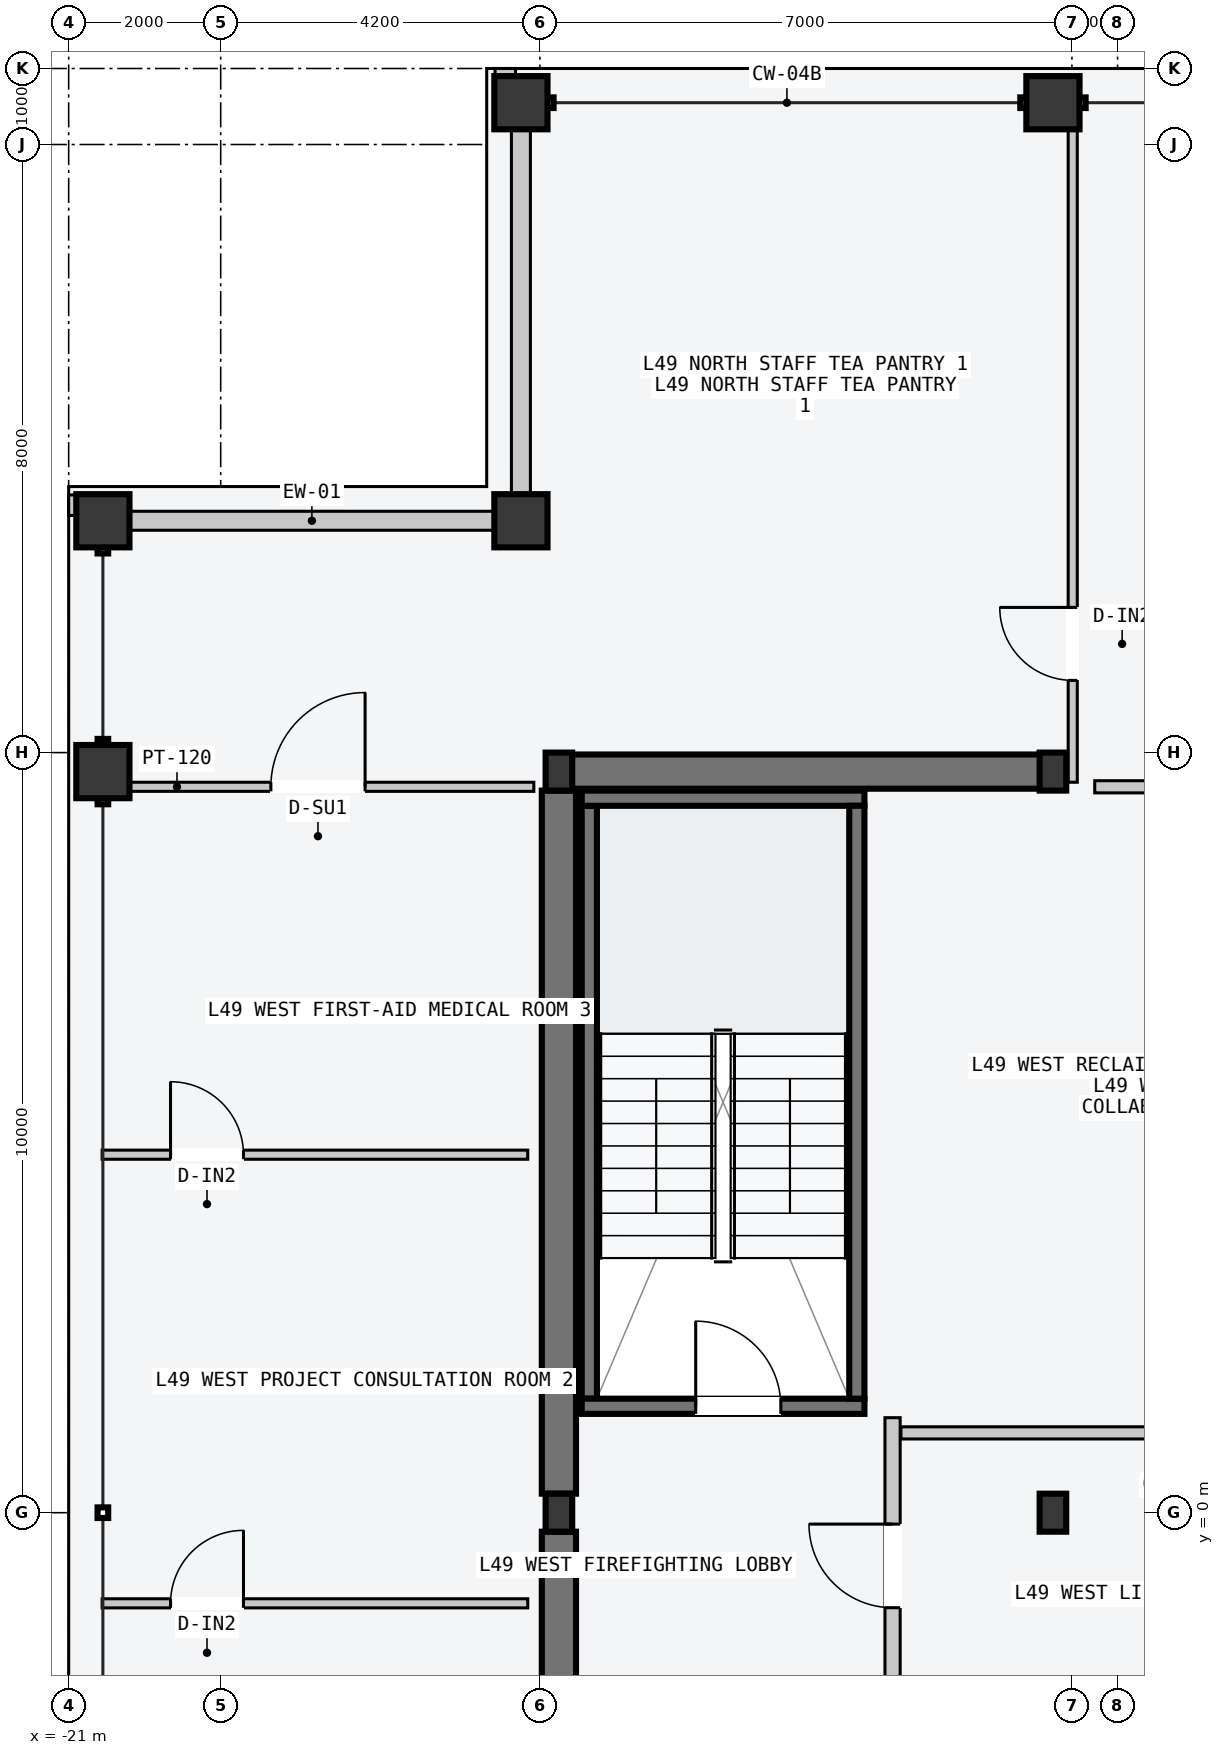
"""IFC4 building model, lengths in metres.
Left out: names, types, materials, properties, quantities, classifications, styles, units other than length and angle.
Written with IfcOpenShell. Run it as: python <this file> out.ifc"""

import sys

from ifc_helpers import new_model, si_unit, direction, frame, frame_2d, origin, origin_2d, place, context, subcontext, project, spatial, rectangle, hollow_rectangle, i_section, extrude, element, fill, save


model = new_model("IFC4")
c1 = context("Model", 3, precision=1e-05, world=origin(), true_north=direction((0.0, 1.0)))
c2 = subcontext(c1, "Body", "Model", "MODEL_VIEW")
j1 = project(units=[si_unit("LENGTHUNIT", "METRE"), si_unit("PLANEANGLEUNIT", "RADIAN")], contexts=[c1])
p1 = place(None, origin())
s1 = spatial("IfcSite", under=j1, at=p1, CompositionType="ELEMENT")
p2 = place(p1, origin())
s2 = spatial("IfcBuilding", under=s1, at=p2, CompositionType="ELEMENT")
p3 = place(p2, frame((0.0, 0.0, 187.5)))
s3 = spatial("IfcBuildingStorey", under=s2, at=p3, CompositionType="ELEMENT", Elevation=187.5)
p4 = place(p3, frame((-14.53, 9.75, -0.2), z_axis=(0.0, 0.0, 1.0), x_axis=(1.0, 0.0, 0.0)))
e1 = element("IfcWall", 1, at=p4, inside=s3, PredefinedType="SHEAR", context=c2, shape_type="SweptSolid", body=[
    extrude(rectangle(XDim=6.46, YDim=0.45, at=frame_2d((3.23, 0.0))), origin(), (0.0, 0.0, 1.0), 3.6),
])
for number, where, z_axis, x_axis in (
    (2, (-14.55, -9.5, -0.2), (0.0, 0.0, 1.0), (0.0, 1.0, 0.0)),
    (3, (-14.55, 0.25, -0.2), (0.0, 0.0, 1.0), (0.0, 1.0, 0.0)),
):
    element("IfcWall", number, at=place(p3, frame(where, z_axis=z_axis, x_axis=x_axis)), inside=s3, PredefinedType="SHEAR", context=c2, shape_type="SweptSolid", body=[
        extrude(rectangle(XDim=9.25, YDim=0.45, at=frame_2d((4.625, 0.0))), origin(), (0.0, 0.0, 1.0), 3.6),
    ])
p5 = place(p3, frame((-14.15, 1.5, -0.2), z_axis=(0.0, 0.0, 1.0), x_axis=(0.0, 1.0, 0.0)))
e4 = element("IfcWall", 4, at=p5, inside=s3, PredefinedType="SOLIDWALL", context=c2, shape_type="SweptSolid", body=[
    extrude(rectangle(XDim=7.8, YDim=0.2, at=frame_2d((3.9, 0.0))), origin(), (0.0, 0.0, 1.0), 3.6),
])
p6 = place(p3, frame((-14.25, 1.4, -0.2), z_axis=(0.0, 0.0, 1.0), x_axis=(1.0, 0.0, 0.0)))
e5 = element("IfcWall", 5, at=p6, inside=s3, PredefinedType="SOLIDWALL", context=c2, shape_type="SweptSolid", body=[
    extrude(rectangle(XDim=3.72, YDim=0.2, at=frame_2d((1.86, 0.0))), origin(), (0.0, 0.0, 1.0), 3.6),
])
p7 = place(p6, frame((1.5, 0.0, 0.2)))
e6 = element("IfcOpeningElement", 6, at=p7, cuts=e5, PredefinedType="OPENING", context=c2, shape_type="SweptSolid", body=[
    extrude(rectangle(XDim=1.12, YDim=2.18, at=frame_2d((0.56, 1.09))), frame((0.0, 0.11, 0.0), z_axis=(0.0, -1.0, 0.0), x_axis=(1.0, 0.0, 0.0)), (0.0, 0.0, 1.0), 0.22),
])
p8 = place(p3, frame((-14.25, 9.4, -0.2), z_axis=(0.0, 0.0, 1.0), x_axis=(1.0, 0.0, 0.0)))
e7 = element("IfcWall", 7, at=p8, inside=s3, PredefinedType="SOLIDWALL", context=c2, shape_type="SweptSolid", body=[
    extrude(rectangle(XDim=3.72, YDim=0.2, at=frame_2d((1.86, 0.0))), origin(), (0.0, 0.0, 1.0), 3.6),
])
p9 = place(p3, frame((-10.63, 1.5, -0.2), z_axis=(0.0, 0.0, 1.0), x_axis=(0.0, 1.0, 0.0)))
e8 = element("IfcWall", 8, at=p9, inside=s3, PredefinedType="SOLIDWALL", context=c2, shape_type="SweptSolid", body=[
    extrude(rectangle(XDim=7.8, YDim=0.2, at=frame_2d((3.9, 0.0))), origin(), (0.0, 0.0, 1.0), 3.6),
])
for number, where, z_axis, x_axis in (
    (9, (-14.55, 0.0, 0.0), (0.0, 0.0, 1.0), (1.0, 0.0, 0.0)),
    (10, (-14.55, 9.75, 0.0), (0.0, 0.0, 1.0), (1.0, 0.0, 0.0)),
    (11, (-8.05, 0.0, 0.0), (0.0, 0.0, 1.0), (1.0, 0.0, 0.0)),
    (12, (-8.05, 9.75, 0.0), (0.0, 0.0, 1.0), (1.0, 0.0, 0.0)),
):
    element("IfcColumn", number, at=place(p3, frame(where, z_axis=z_axis, x_axis=x_axis)), inside=s3, PredefinedType="COLUMN", context=c2, shape_type="SweptSolid", body=[
        extrude(i_section(OverallWidth=0.35, OverallDepth=0.5, WebThickness=0.02, FlangeThickness=0.032, at=origin_2d()), origin(), (0.0, 0.0, 1.0), 3.6),
    ])
for number, where, z_axis, x_axis in (
    (13, (-15.05, 18.55, 0.0), (0.0, 0.0, 1.0), (1.0, 0.0, 0.0)),
    (14, (-8.05, 18.55, 0.0), (0.0, 0.0, 1.0), (1.0, 0.0, 0.0)),
    (15, (-20.55, 9.75, 0.0), (0.0, 0.0, 1.0), (0.0, 1.0, 0.0)),
    (16, (-20.55, 13.05, 0.0), (0.0, 0.0, 1.0), (0.0, 1.0, 0.0)),
    (17, (-15.05, 13.05, 0.0), (0.0, 0.0, 1.0), (1.0, 0.0, 0.0)),
):
    element("IfcColumn", number, at=place(p3, frame(where, z_axis=z_axis, x_axis=x_axis)), inside=s3, PredefinedType="COLUMN", context=c2, shape_type="SweptSolid", body=[
        extrude(hollow_rectangle(XDim=0.7, YDim=0.7, WallThickness=0.03, at=origin_2d()), origin(), (0.0, 0.0, 1.0), 3.6),
    ])
for number, where, z_axis, x_axis in (
    (18, (-20.19, 13.05, 0.0), (0.0, 0.0, 1.0), (1.0, 0.0, 0.0)),
    (19, (-15.05, 13.41, 0.0), (0.0, 0.0, 1.0), (0.0, 1.0, 0.0)),
):
    element("IfcWall", number, at=place(p3, frame(where, z_axis=z_axis, x_axis=x_axis)), inside=s3, PredefinedType="STANDARD", context=c2, shape_type="SweptSolid", body=[
        extrude(rectangle(XDim=4.78, YDim=0.25, at=frame_2d((2.39, 0.0))), origin(), (0.0, 0.0, 1.0), 2.75),
    ])
for number, where, z_axis, x_axis in (
    (20, (-15.39, 18.89, 0.0), (0.0, 0.0, 1.0), (1.0, 0.0, 0.0)),
    (21, (-20.89, 13.12, 0.0), (0.0, 0.0, 1.0), (0.0, 1.0, 0.0)),
):
    element("IfcWall", number, at=place(p3, frame(where, z_axis=z_axis, x_axis=x_axis)), inside=s3, PredefinedType="PARAPET", context=c2, shape_type="SweptSolid", body=[
        extrude(rectangle(XDim=0.27, YDim=0.22, at=frame_2d((0.135, 0.0))), origin(), (0.0, 0.0, 1.0), 1.2),
    ])
p10 = place(p3, frame((-10.16, -2.55, 0.0), z_axis=(0.0, 0.0, 1.0), x_axis=(0.0, 1.0, 0.0)))
e22 = element("IfcWall", 22, at=p10, inside=s3, PredefinedType="PARTITIONING", context=c2, shape_type="SweptSolid", body=[
    extrude(rectangle(XDim=3.8, YDim=0.2, at=frame_2d((1.9, 0.0))), origin(), (0.0, 0.0, 1.0), 3.4),
])
p11 = place(p10, frame((1.3, 0.0, 0.0)))
e23 = element("IfcOpeningElement", 23, at=p11, cuts=e22, PredefinedType="OPENING", context=c2, shape_type="SweptSolid", body=[
    extrude(rectangle(XDim=1.1, YDim=2.15, at=frame_2d((0.55, 1.075))), frame((0.0, 0.11, 0.0), z_axis=(0.0, -1.0, 0.0), x_axis=(1.0, 0.0, 0.0)), (0.0, 0.0, 1.0), 0.22),
])
p12 = place(p3, frame((-10.05, 1.05, 0.0), z_axis=(0.0, 0.0, 1.0), x_axis=(1.0, 0.0, 0.0)))
e24 = element("IfcWall", 24, at=p12, inside=s3, PredefinedType="PARTITIONING", context=c2, shape_type="SweptSolid", body=[
    extrude(rectangle(XDim=8.79, YDim=0.16, at=frame_2d((4.395, 0.0))), origin(), (0.0, 0.0, 1.0), 3.4),
])
p13 = place(p3, frame((-7.5, 9.55, 0.0), z_axis=(0.0, 0.0, 1.0), x_axis=(1.0, 0.0, 0.0)))
e25 = element("IfcWall", 25, at=p13, inside=s3, PredefinedType="PARTITIONING", context=c2, shape_type="SweptSolid", body=[
    extrude(rectangle(XDim=6.24, YDim=0.16, at=frame_2d((3.12, 0.0))), origin(), (0.0, 0.0, 1.0), 3.4),
])
p14 = place(p3, frame((-7.79, 9.61, 0.0), z_axis=(0.0, 0.0, 1.0), x_axis=(0.0, 1.0, 0.0)))
e26 = element("IfcWall", 26, at=p14, inside=s3, PredefinedType="PARTITIONING", context=c2, shape_type="SweptSolid", body=[
    extrude(rectangle(XDim=8.95, YDim=0.12, at=frame_2d((4.475, 0.0))), origin(), (0.0, 0.0, 1.0), 3.4),
])
p15 = place(p14, frame((1.34, 0.0, 0.0)))
e27 = element("IfcOpeningElement", 27, at=p15, cuts=e26, PredefinedType="OPENING", context=c2, shape_type="SweptSolid", body=[
    extrude(rectangle(XDim=0.96, YDim=2.18, at=frame_2d((0.48, 1.09))), frame((0.0, 0.07, 0.0), z_axis=(0.0, -1.0, 0.0), x_axis=(1.0, 0.0, 0.0)), (0.0, 0.0, 1.0), 0.14),
])
p16 = place(p3, frame((-20.56, 9.55, 0.0), z_axis=(0.0, 0.0, 1.0), x_axis=(1.0, 0.0, 0.0)))
e28 = element("IfcWall", 28, at=p16, inside=s3, PredefinedType="PARTITIONING", context=c2, shape_type="SweptSolid", body=[
    extrude(rectangle(XDim=5.68, YDim=0.12, at=frame_2d((2.84, 0.0))), origin(), (0.0, 0.0, 1.0), 3.4),
])
p17 = place(p16, frame((2.22, 0.0, 0.0)))
e29 = element("IfcOpeningElement", 29, at=p17, cuts=e28, PredefinedType="OPENING", context=c2, shape_type="SweptSolid", body=[
    extrude(rectangle(XDim=1.24, YDim=2.24, at=frame_2d((0.62, 1.12))), frame((0.0, 0.07, 0.0), z_axis=(0.0, -1.0, 0.0), x_axis=(1.0, 0.0, 0.0)), (0.0, 0.0, 1.0), 0.14),
])
p18 = place(p3, frame((-20.56, -1.192, 0.0), z_axis=(0.0, 0.0, 1.0), x_axis=(1.0, 0.0, 0.0)))
e30 = element("IfcWall", 30, at=p18, inside=s3, PredefinedType="PARTITIONING", context=c2, shape_type="SweptSolid", body=[
    extrude(rectangle(XDim=5.6, YDim=0.12, at=frame_2d((2.8, 0.0))), origin(), (0.0, 0.0, 1.0), 3.4),
])
p19 = place(p18, frame((0.9, 0.0, 0.0)))
e31 = element("IfcOpeningElement", 31, at=p19, cuts=e30, PredefinedType="OPENING", context=c2, shape_type="SweptSolid", body=[
    extrude(rectangle(XDim=0.96, YDim=2.18, at=frame_2d((0.48, 1.09))), frame((0.0, 0.07, 0.0), z_axis=(0.0, -1.0, 0.0), x_axis=(1.0, 0.0, 0.0)), (0.0, 0.0, 1.0), 0.14),
])
p20 = place(p3, frame((-20.56, 4.71, 0.0), z_axis=(0.0, 0.0, 1.0), x_axis=(1.0, 0.0, 0.0)))
e32 = element("IfcWall", 32, at=p20, inside=s3, PredefinedType="PARTITIONING", context=c2, shape_type="SweptSolid", body=[
    extrude(rectangle(XDim=5.6, YDim=0.12, at=frame_2d((2.8, 0.0))), origin(), (0.0, 0.0, 1.0), 3.4),
])
p21 = place(p20, frame((0.9, 0.0, 0.0)))
e33 = element("IfcOpeningElement", 33, at=p21, cuts=e32, PredefinedType="OPENING", context=c2, shape_type="SweptSolid", body=[
    extrude(rectangle(XDim=0.96, YDim=2.18, at=frame_2d((0.48, 1.09))), frame((0.0, 0.07, 0.0), z_axis=(0.0, -1.0, 0.0), x_axis=(1.0, 0.0, 0.0)), (0.0, 0.0, 1.0), 0.14),
])
p22 = place(p7, origin())
e34 = element("IfcDoor", 34, at=p22, inside=s3, OperationType="SINGLE_SWING_LEFT", PredefinedType="DOOR", context=c2, shape_type="SweptSolid", body=[
    extrude(rectangle(XDim=1.12, YDim=2.18, at=frame_2d((0.56, 1.09))), frame((0.0, 0.025, 0.0), z_axis=(0.0, -1.0, 0.0), x_axis=(1.0, 0.0, 0.0)), (0.0, 0.0, 1.0), 0.05),
])
fill(e6, e34)
p23 = place(p11, origin())
e35 = element("IfcDoor", 35, at=p23, inside=s3, OperationType="SINGLE_SWING_RIGHT", PredefinedType="DOOR", context=c2, shape_type="SweptSolid", body=[
    extrude(rectangle(XDim=1.1, YDim=2.15, at=frame_2d((0.55, 1.075))), frame((0.0, 0.025, 0.0), z_axis=(0.0, -1.0, 0.0), x_axis=(1.0, 0.0, 0.0)), (0.0, 0.0, 1.0), 0.05),
])
fill(e23, e35)
p24 = place(p15, origin())
e36 = element("IfcDoor", 36, at=p24, inside=s3, OperationType="SINGLE_SWING_RIGHT", PredefinedType="DOOR", context=c2, shape_type="SweptSolid", body=[
    extrude(rectangle(XDim=0.96, YDim=2.18, at=frame_2d((0.48, 1.09))), frame((0.0, 0.025, 0.0), z_axis=(0.0, -1.0, 0.0), x_axis=(1.0, 0.0, 0.0)), (0.0, 0.0, 1.0), 0.05),
])
fill(e27, e36)
p25 = place(p17, origin())
e37 = element("IfcDoor", 37, at=p25, inside=s3, OperationType="SINGLE_SWING_RIGHT", PredefinedType="DOOR", context=c2, shape_type="SweptSolid", body=[
    extrude(rectangle(XDim=1.24, YDim=2.24, at=frame_2d((0.62, 1.12))), frame((0.0, 0.025, 0.0), z_axis=(0.0, -1.0, 0.0), x_axis=(1.0, 0.0, 0.0)), (0.0, 0.0, 1.0), 0.05),
])
fill(e29, e37)
p26 = place(p19, origin())
e38 = element("IfcDoor", 38, at=p26, inside=s3, OperationType="SINGLE_SWING_RIGHT", PredefinedType="DOOR", context=c2, shape_type="SweptSolid", body=[
    extrude(rectangle(XDim=0.96, YDim=2.18, at=frame_2d((0.48, 1.09))), frame((0.0, 0.025, 0.0), z_axis=(0.0, -1.0, 0.0), x_axis=(1.0, 0.0, 0.0)), (0.0, 0.0, 1.0), 0.05),
])
fill(e31, e38)
p27 = place(p21, origin())
e39 = element("IfcDoor", 39, at=p27, inside=s3, OperationType="SINGLE_SWING_LEFT", PredefinedType="DOOR", context=c2, shape_type="SweptSolid", body=[
    extrude(rectangle(XDim=0.96, YDim=2.18, at=frame_2d((0.48, 1.09))), frame((0.0, 0.025, 0.0), z_axis=(0.0, -1.0, 0.0), x_axis=(1.0, 0.0, 0.0)), (0.0, 0.0, 1.0), 0.05),
])
fill(e33, e39)
save(model, sys.argv[1])
